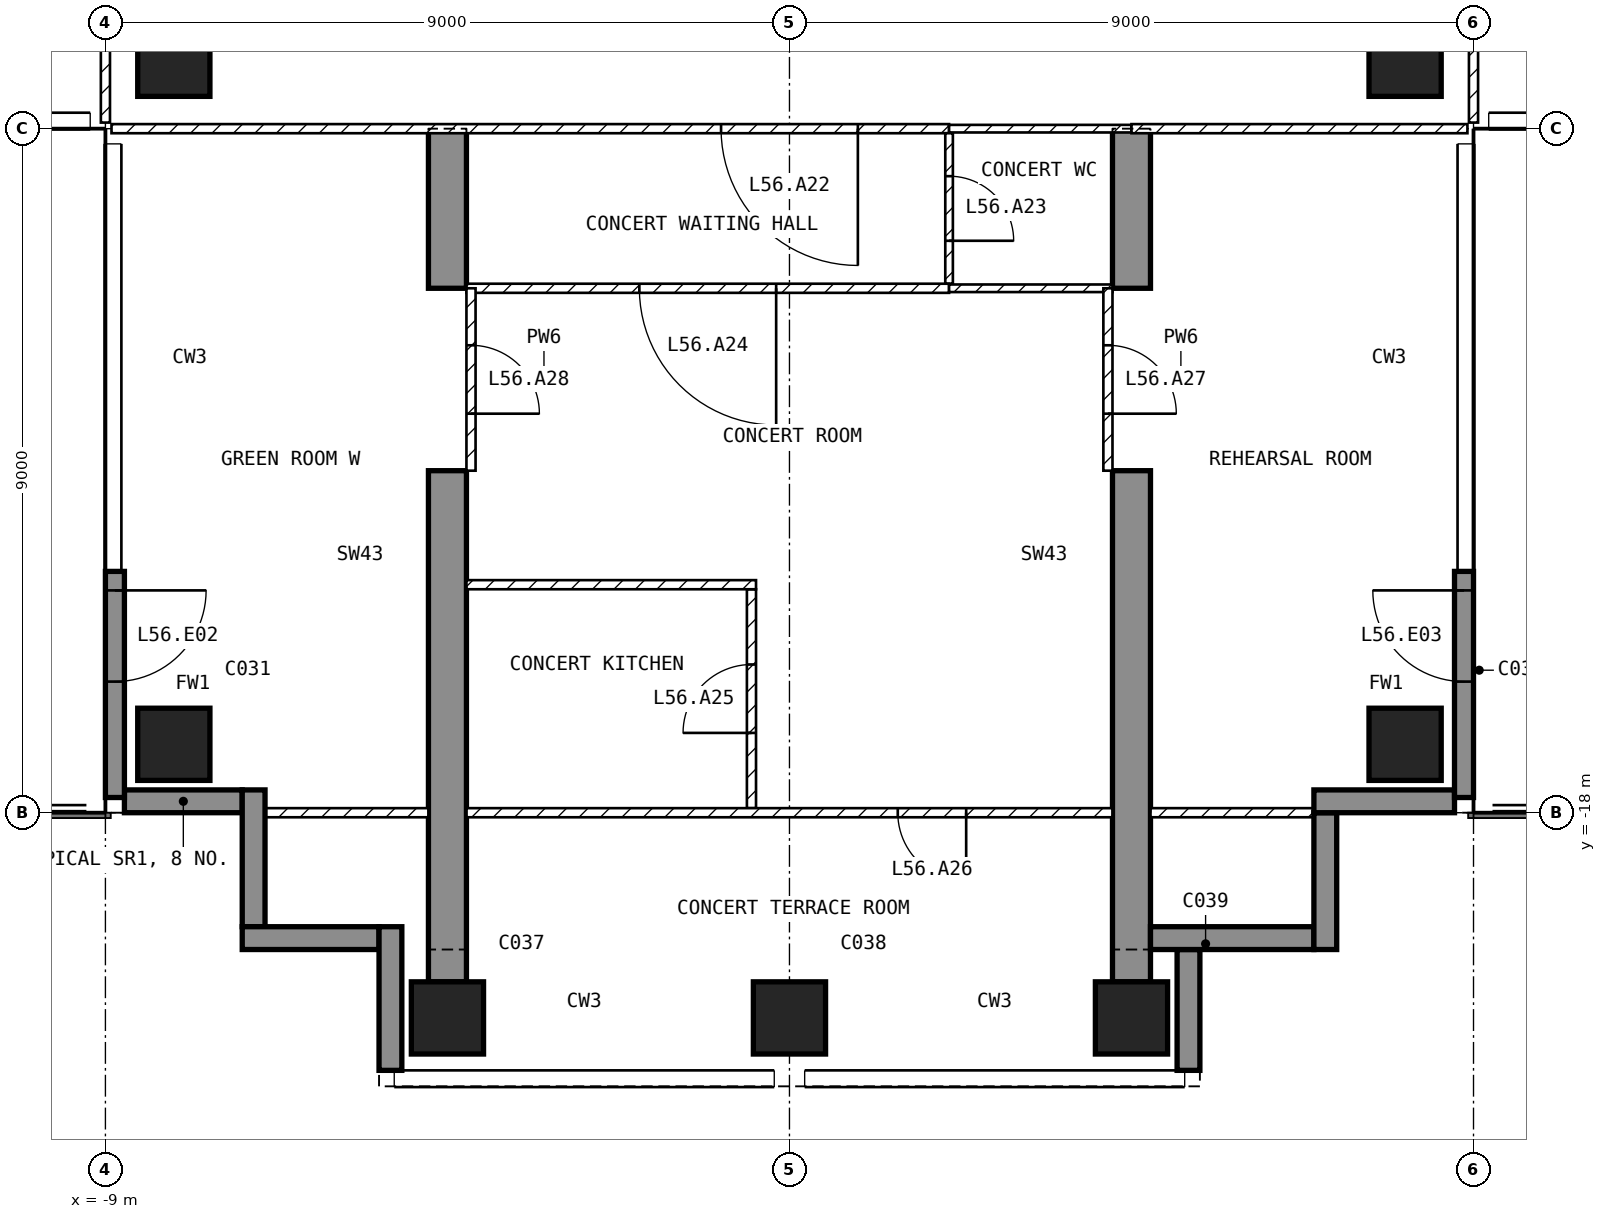
"""IFC4 building model, lengths in metres.
Left out: names, types, materials, properties, quantities, classifications, styles, units other than length and angle.
Written with IfcOpenShell. Run it as: python <this file> out.ifc"""

import sys

from ifc_helpers import new_model, si_unit, direction, frame, frame_2d, origin, origin_2d, place, context, subcontext, project, spatial, polyline, rectangle, outline, extrude, element, fill, save


model = new_model("IFC4")
c1 = context("Model", 3, precision=1e-05, world=origin(), true_north=direction((0.0, 1.0)))
c2 = subcontext(c1, "Body", "Model", "MODEL_VIEW")
j1 = project(units=[si_unit("LENGTHUNIT", "METRE"), si_unit("PLANEANGLEUNIT", "RADIAN")], contexts=[c1])
p1 = place(None, origin())
s1 = spatial("IfcSite", under=j1, at=p1, CompositionType="ELEMENT")
p2 = place(p1, origin())
s2 = spatial("IfcBuilding", under=s1, at=p2, CompositionType="ELEMENT")
p3 = place(p2, frame((0.0, 0.0, 222.6)))
s3 = spatial("IfcBuildingStorey", under=s2, at=p3, CompositionType="ELEMENT", Elevation=222.6)
for number, where, z_axis, x_axis in (
    (1, (-8.1, -17.1, -0.3), (0.0, 0.0, 1.0), (1.0, 0.0, 0.0)),
    (2, (-8.1, -8.1, -0.3), (0.0, 0.0, 1.0), (1.0, 0.0, 0.0)),
    (3, (-4.5, -20.7, -0.3), (0.0, 0.0, 1.0), (1.0, 0.0, 0.0)),
    (4, (0.0, -20.7, -0.3), (0.0, 0.0, 1.0), (1.0, 0.0, 0.0)),
    (5, (4.5, -20.7, -0.3), (0.0, 0.0, 1.0), (1.0, 0.0, 0.0)),
    (6, (8.1, -17.1, -0.3), (0.0, 0.0, 1.0), (1.0, 0.0, 0.0)),
    (7, (8.1, -8.1, -0.3), (0.0, 0.0, 1.0), (1.0, 0.0, 0.0)),
):
    element("IfcColumn", number, at=place(p3, frame(where, z_axis=z_axis, x_axis=x_axis)), inside=s3, PredefinedType="COLUMN", context=c2, shape_type="SweptSolid", body=[
        extrude(rectangle(XDim=0.95, YDim=0.95, at=origin_2d()), origin(), (0.0, 0.0, 1.0), 5.25),
    ])
for number, where, z_axis, x_axis in (
    (8, (-4.75, -20.225, -0.3), (1.0, 0.0, 0.0), (0.0, 1.0, 0.0)),
    (9, (4.25, -20.225, -0.3), (1.0, 0.0, 0.0), (0.0, 1.0, 0.0)),
):
    element("IfcWall", number, at=place(p3, frame(where, z_axis=z_axis, x_axis=x_axis)), inside=s3, PredefinedType="SHEAR", context=c2, shape_type="SweptSolid", body=[
        extrude(outline(polyline([(0.0, 0.0), (6.725, 0.0), (6.725, 2.7), (9.125, 2.7), (9.125, 0.0), (11.225, 0.0), (11.225, 5.25), (0.0, 5.25), (0.0, 0.0)])), origin(), (0.0, 0.0, 1.0), 0.5),
    ])
p4 = place(p3, frame((-8.875, -14.825, 0.0), z_axis=(0.0, 0.0, 1.0), x_axis=(0.0, -1.0, 0.0)))
e10 = element("IfcWall", 10, at=p4, inside=s3, PredefinedType="SOLIDWALL", context=c2, shape_type="SweptSolid", body=[
    extrude(rectangle(XDim=2.975, YDim=0.25, at=frame_2d((1.488, 0.0))), origin(), (0.0, 0.0, 1.0), 4.95),
])
p5 = place(p4, frame((0.25, 0.0, 0.0)))
e11 = element("IfcOpeningElement", 11, at=p5, cuts=e10, PredefinedType="OPENING", context=c2, shape_type="SweptSolid", body=[
    extrude(rectangle(XDim=1.2, YDim=2.4, at=frame_2d((0.6, 1.2))), frame((0.0, 0.135, 0.0), z_axis=(0.0, -1.0, 0.0), x_axis=(1.0, 0.0, 0.0)), (0.0, 0.0, 1.0), 0.27),
])
p6 = place(p3, frame((8.875, -17.8, 0.0), z_axis=(0.0, 0.0, 1.0), x_axis=(0.0, 1.0, 0.0)))
e12 = element("IfcWall", 12, at=p6, inside=s3, PredefinedType="SOLIDWALL", context=c2, shape_type="SweptSolid", body=[
    extrude(rectangle(XDim=2.975, YDim=0.25, at=frame_2d((1.488, 0.0))), origin(), (0.0, 0.0, 1.0), 4.95),
])
p7 = place(p6, frame((1.525, 0.0, 0.0)))
e13 = element("IfcOpeningElement", 13, at=p7, cuts=e12, PredefinedType="OPENING", context=c2, shape_type="SweptSolid", body=[
    extrude(rectangle(XDim=1.2, YDim=2.4, at=frame_2d((0.6, 1.2))), frame((0.0, 0.135, 0.0), z_axis=(0.0, -1.0, 0.0), x_axis=(1.0, 0.0, 0.0)), (0.0, 0.0, 1.0), 0.27),
])
p8 = place(p3, frame((5.25, -21.39, 0.0), z_axis=(0.0, 0.0, 1.0), x_axis=(0.0, 1.0, 0.0)))
e14 = element("IfcWall", 14, at=p8, inside=s3, PredefinedType="SOLIDWALL", context=c2, shape_type="SweptSolid", body=[
    extrude(rectangle(XDim=1.59, YDim=0.3, at=frame_2d((0.795, 0.0))), origin(), (0.0, 0.0, 1.0), 4.95),
])
p9 = place(p3, frame((4.75, -19.65, 0.0), z_axis=(0.0, 0.0, 1.0), x_axis=(1.0, 0.0, 0.0)))
e15 = element("IfcWall", 15, at=p9, inside=s3, PredefinedType="SOLIDWALL", context=c2, shape_type="SweptSolid", body=[
    extrude(rectangle(XDim=2.15, YDim=0.3, at=frame_2d((1.075, 0.0))), origin(), (0.0, 0.0, 1.0), 4.95),
])
p10 = place(p3, frame((7.05, -19.8, 0.0), z_axis=(0.0, 0.0, 1.0), x_axis=(0.0, 1.0, 0.0)))
e16 = element("IfcWall", 16, at=p10, inside=s3, PredefinedType="SOLIDWALL", context=c2, shape_type="SweptSolid", body=[
    extrude(rectangle(XDim=1.8, YDim=0.3, at=frame_2d((0.9, 0.0))), origin(), (0.0, 0.0, 1.0), 4.95),
])
p11 = place(p3, frame((6.9, -17.85, 0.0), z_axis=(0.0, 0.0, 1.0), x_axis=(1.0, 0.0, 0.0)))
e17 = element("IfcWall", 17, at=p11, inside=s3, PredefinedType="SOLIDWALL", context=c2, shape_type="SweptSolid", body=[
    extrude(rectangle(XDim=1.85, YDim=0.3, at=frame_2d((0.925, 0.0))), origin(), (0.0, 0.0, 1.0), 4.95),
])
p12 = place(p3, frame((-8.75, -17.85, 0.0), z_axis=(0.0, 0.0, 1.0), x_axis=(1.0, 0.0, 0.0)))
e18 = element("IfcWall", 18, at=p12, inside=s3, PredefinedType="SOLIDWALL", context=c2, shape_type="SweptSolid", body=[
    extrude(rectangle(XDim=1.55, YDim=0.3, at=frame_2d((0.775, 0.0))), origin(), (0.0, 0.0, 1.0), 4.95),
])
for number, where, z_axis, x_axis in (
    (19, (-7.05, -17.7, 0.0), (0.0, 0.0, 1.0), (0.0, -1.0, 0.0)),
    (20, (-7.2, -19.65, 0.0), (0.0, 0.0, 1.0), (1.0, 0.0, 0.0)),
):
    element("IfcWall", number, at=place(p3, frame(where, z_axis=z_axis, x_axis=x_axis)), inside=s3, PredefinedType="SOLIDWALL", context=c2, shape_type="SweptSolid", body=[
        extrude(rectangle(XDim=1.8, YDim=0.3, at=frame_2d((0.9, 0.0))), origin(), (0.0, 0.0, 1.0), 4.95),
    ])
p13 = place(p3, frame((-5.25, -19.5, 0.0), z_axis=(0.0, 0.0, 1.0), x_axis=(0.0, -1.0, 0.0)))
e21 = element("IfcWall", 21, at=p13, inside=s3, PredefinedType="SOLIDWALL", context=c2, shape_type="SweptSolid", body=[
    extrude(rectangle(XDim=1.89, YDim=0.3, at=frame_2d((0.945, 0.0))), origin(), (0.0, 0.0, 1.0), 4.95),
])
p14 = place(p3, frame((9.0, -1.26, 0.0), z_axis=(0.0, 0.0, 1.0), x_axis=(0.0, -1.0, 0.0)))
e22 = element("IfcWall", 22, at=p14, inside=s3, PredefinedType="PARTITIONING", context=c2, shape_type="SweptSolid", body=[
    extrude(rectangle(XDim=7.66, YDim=0.12, at=frame_2d((3.83, 0.0))), origin(), (0.0, 0.0, 1.0), 4.95),
])
p15 = place(p14, frame((4.34, 0.0, 0.0)))
e23 = element("IfcOpeningElement", 23, at=p15, cuts=e22, PredefinedType="OPENING", context=c2, shape_type="SweptSolid", body=[
    extrude(rectangle(XDim=0.9, YDim=2.1, at=frame_2d((0.45, 1.05))), frame((0.0, 0.07, 0.0), z_axis=(0.0, -1.0, 0.0), x_axis=(1.0, 0.0, 0.0)), (0.0, 0.0, 1.0), 0.14),
])
p16 = place(p3, frame((-9.0, -8.92, 0.0), z_axis=(0.0, 0.0, 1.0), x_axis=(0.0, 1.0, 0.0)))
e24 = element("IfcWall", 24, at=p16, inside=s3, PredefinedType="PARTITIONING", context=c2, shape_type="SweptSolid", body=[
    extrude(rectangle(XDim=7.66, YDim=0.12, at=frame_2d((3.83, 0.0))), origin(), (0.0, 0.0, 1.0), 4.95),
])
p17 = place(p3, frame((2.1, -9.0, 0.0), z_axis=(0.0, 0.0, 1.0), x_axis=(-1.0, 0.0, 0.0)))
e25 = element("IfcWall", 25, at=p17, inside=s3, PredefinedType="PARTITIONING", context=c2, shape_type="SweptSolid", body=[
    extrude(rectangle(XDim=11.02, YDim=0.12, at=frame_2d((5.51, 0.0))), origin(), (0.0, 0.0, 1.0), 4.95),
])
p18 = place(p17, frame((1.2, 0.0, 0.0)))
e26 = element("IfcOpeningElement", 26, at=p18, cuts=e25, PredefinedType="OPENING", context=c2, shape_type="SweptSolid", body=[
    extrude(rectangle(XDim=1.8, YDim=2.1, at=frame_2d((0.9, 1.05))), frame((0.0, 0.07, 0.0), z_axis=(0.0, -1.0, 0.0), x_axis=(1.0, 0.0, 0.0)), (0.0, 0.0, 1.0), 0.14),
])
p19 = place(p3, frame((4.5, -9.0, 0.0), z_axis=(0.0, 0.0, 1.0), x_axis=(-1.0, 0.0, 0.0)))
e27 = element("IfcWall", 27, at=p19, inside=s3, PredefinedType="PARTITIONING", context=c2, shape_type="SweptSolid", body=[
    extrude(rectangle(XDim=2.4, YDim=0.1, at=frame_2d((1.2, 0.0))), origin(), (0.0, 0.0, 1.0), 4.95),
])
p20 = place(p3, frame((8.92, -9.0, 0.0), z_axis=(0.0, 0.0, 1.0), x_axis=(-1.0, 0.0, 0.0)))
e28 = element("IfcWall", 28, at=p20, inside=s3, PredefinedType="PARTITIONING", context=c2, shape_type="SweptSolid", body=[
    extrude(rectangle(XDim=4.42, YDim=0.12, at=frame_2d((2.21, 0.0))), origin(), (0.0, 0.0, 1.0), 4.95),
])
p21 = place(p3, frame((2.1, -9.06, 0.0), z_axis=(0.0, 0.0, 1.0), x_axis=(0.0, -1.0, 0.0)))
e29 = element("IfcWall", 29, at=p21, inside=s3, PredefinedType="PARTITIONING", context=c2, shape_type="SweptSolid", body=[
    extrude(rectangle(XDim=1.98, YDim=0.1, at=frame_2d((0.99, 0.0))), origin(), (0.0, 0.0, 1.0), 4.95),
])
p22 = place(p21, frame((0.565, 0.0, 0.0)))
e30 = element("IfcOpeningElement", 30, at=p22, cuts=e29, PredefinedType="OPENING", context=c2, shape_type="SweptSolid", body=[
    extrude(rectangle(XDim=0.85, YDim=2.1, at=frame_2d((0.425, 1.05))), frame((0.0, 0.06, 0.0), z_axis=(0.0, -1.0, 0.0), x_axis=(1.0, 0.0, 0.0)), (0.0, 0.0, 1.0), 0.12),
])
p23 = place(p3, frame((2.1, -11.1, 0.0), z_axis=(0.0, 0.0, 1.0), x_axis=(-1.0, 0.0, 0.0)))
e31 = element("IfcWall", 31, at=p23, inside=s3, PredefinedType="PARTITIONING", context=c2, shape_type="SweptSolid", body=[
    extrude(rectangle(XDim=6.35, YDim=0.12, at=frame_2d((3.175, 0.0))), origin(), (0.0, 0.0, 1.0), 4.95),
])
p24 = place(p23, frame((2.275, 0.0, 0.0)))
e32 = element("IfcOpeningElement", 32, at=p24, cuts=e31, PredefinedType="OPENING", context=c2, shape_type="SweptSolid", body=[
    extrude(rectangle(XDim=1.8, YDim=2.1, at=frame_2d((0.9, 1.05))), frame((0.0, 0.07, 0.0), z_axis=(0.0, -1.0, 0.0), x_axis=(1.0, 0.0, 0.0)), (0.0, 0.0, 1.0), 0.14),
])
p25 = place(p3, frame((4.25, -11.1, 0.0), z_axis=(0.0, 0.0, 1.0), x_axis=(-1.0, 0.0, 0.0)))
e33 = element("IfcWall", 33, at=p25, inside=s3, PredefinedType="PARTITIONING", context=c2, shape_type="SweptSolid", body=[
    extrude(rectangle(XDim=2.15, YDim=0.1, at=frame_2d((1.075, 0.0))), origin(), (0.0, 0.0, 1.0), 4.95),
])
p26 = place(p3, frame((-0.5, -17.94, 0.0), z_axis=(0.0, 0.0, 1.0), x_axis=(0.0, 1.0, 0.0)))
e34 = element("IfcWall", 34, at=p26, inside=s3, PredefinedType="PARTITIONING", context=c2, shape_type="SweptSolid", body=[
    extrude(rectangle(XDim=2.88, YDim=0.12, at=frame_2d((1.44, 0.0))), origin(), (0.0, 0.0, 1.0), 4.95),
])
p27 = place(p26, frame((0.99, 0.0, 0.0)))
e35 = element("IfcOpeningElement", 35, at=p27, cuts=e34, PredefinedType="OPENING", context=c2, shape_type="SweptSolid", body=[
    extrude(rectangle(XDim=0.9, YDim=2.1, at=frame_2d((0.45, 1.05))), frame((0.0, 0.07, 0.0), z_axis=(0.0, -1.0, 0.0), x_axis=(1.0, 0.0, 0.0)), (0.0, 0.0, 1.0), 0.14),
])
p28 = place(p3, frame((-0.44, -15.0, 0.0), z_axis=(0.0, 0.0, 1.0), x_axis=(-1.0, 0.0, 0.0)))
e36 = element("IfcWall", 36, at=p28, inside=s3, PredefinedType="PARTITIONING", context=c2, shape_type="SweptSolid", body=[
    extrude(rectangle(XDim=3.81, YDim=0.12, at=frame_2d((1.905, 0.0))), origin(), (0.0, 0.0, 1.0), 4.95),
])
p29 = place(p3, frame((4.25, -18.0, 0.0), z_axis=(0.0, 0.0, 1.0), x_axis=(-1.0, 0.0, 0.0)))
e37 = element("IfcWall", 37, at=p29, inside=s3, PredefinedType="PARTITIONING", context=c2, shape_type="SweptSolid", body=[
    extrude(rectangle(XDim=8.5, YDim=0.12, at=frame_2d((4.25, 0.0))), origin(), (0.0, 0.0, 1.0), 4.95),
])
p30 = place(p29, frame((1.925, 0.0, 0.0)))
e38 = element("IfcOpeningElement", 38, at=p30, cuts=e37, PredefinedType="OPENING", context=c2, shape_type="SweptSolid", body=[
    extrude(rectangle(XDim=0.9, YDim=2.1, at=frame_2d((0.45, 1.05))), frame((0.0, 0.07, 0.0), z_axis=(0.0, -1.0, 0.0), x_axis=(1.0, 0.0, 0.0)), (0.0, 0.0, 1.0), 0.14),
])
for number, where, z_axis, x_axis in (
    (39, (7.12, -18.0, 0.0), (0.0, 0.0, 1.0), (-1.0, 0.0, 0.0)),
    (40, (-4.75, -18.0, 0.0), (0.0, 0.0, 1.0), (-1.0, 0.0, 0.0)),
):
    element("IfcWall", number, at=place(p3, frame(where, z_axis=z_axis, x_axis=x_axis)), inside=s3, PredefinedType="PARTITIONING", context=c2, shape_type="SweptSolid", body=[
        extrude(rectangle(XDim=2.37, YDim=0.12, at=frame_2d((1.185, 0.0))), origin(), (0.0, 0.0, 1.0), 4.95),
    ])
p31 = place(p3, frame((4.19, -11.1, 0.0), z_axis=(0.0, 0.0, 1.0), x_axis=(0.0, -1.0, 0.0)))
e41 = element("IfcWall", 41, at=p31, inside=s3, PredefinedType="PARTITIONING", context=c2, shape_type="SweptSolid", body=[
    extrude(rectangle(XDim=2.4, YDim=0.12, at=frame_2d((1.2, 0.0))), origin(), (0.0, 0.0, 1.0), 2.4),
])
p32 = place(p31, frame((0.75, 0.0, 0.0)))
e42 = element("IfcOpeningElement", 42, at=p32, cuts=e41, PredefinedType="OPENING", context=c2, shape_type="SweptSolid", body=[
    extrude(rectangle(XDim=0.9, YDim=2.1, at=frame_2d((0.45, 1.05))), frame((0.0, 0.07, 0.0), z_axis=(0.0, -1.0, 0.0), x_axis=(1.0, 0.0, 0.0)), (0.0, 0.0, 1.0), 0.14),
])
p33 = place(p3, frame((-4.19, -11.1, 0.0), z_axis=(0.0, 0.0, 1.0), x_axis=(0.0, -1.0, 0.0)))
e43 = element("IfcWall", 43, at=p33, inside=s3, PredefinedType="PARTITIONING", context=c2, shape_type="SweptSolid", body=[
    extrude(rectangle(XDim=2.4, YDim=0.12, at=frame_2d((1.2, 0.0))), origin(), (0.0, 0.0, 1.0), 2.4),
])
p34 = place(p33, frame((0.75, 0.0, 0.0)))
e44 = element("IfcOpeningElement", 44, at=p34, cuts=e43, PredefinedType="OPENING", context=c2, shape_type="SweptSolid", body=[
    extrude(rectangle(XDim=0.9, YDim=2.1, at=frame_2d((0.45, 1.05))), frame((0.0, 0.07, 0.0), z_axis=(0.0, -1.0, 0.0), x_axis=(1.0, 0.0, 0.0)), (0.0, 0.0, 1.0), 0.14),
])
p35 = place(p5, origin())
e45 = element("IfcDoor", 45, at=p35, inside=s3, OperationType="SINGLE_SWING_LEFT", PredefinedType="DOOR", context=c2, shape_type="SweptSolid", body=[
    extrude(rectangle(XDim=1.2, YDim=2.4, at=frame_2d((0.6, 1.2))), frame((0.0, 0.025, 0.0), z_axis=(0.0, -1.0, 0.0), x_axis=(1.0, 0.0, 0.0)), (0.0, 0.0, 1.0), 0.05),
])
fill(e11, e45)
p36 = place(p7, origin())
e46 = element("IfcDoor", 46, at=p36, inside=s3, OperationType="SINGLE_SWING_RIGHT", PredefinedType="DOOR", context=c2, shape_type="SweptSolid", body=[
    extrude(rectangle(XDim=1.2, YDim=2.4, at=frame_2d((0.6, 1.2))), frame((0.0, 0.025, 0.0), z_axis=(0.0, -1.0, 0.0), x_axis=(1.0, 0.0, 0.0)), (0.0, 0.0, 1.0), 0.05),
])
fill(e13, e46)
p37 = place(p18, origin())
e47 = element("IfcDoor", 47, at=p37, inside=s3, OperationType="SINGLE_SWING_LEFT", PredefinedType="DOOR", context=c2, shape_type="SweptSolid", body=[
    extrude(rectangle(XDim=1.8, YDim=2.1, at=frame_2d((0.9, 1.05))), frame((0.0, 0.025, 0.0), z_axis=(0.0, -1.0, 0.0), x_axis=(1.0, 0.0, 0.0)), (0.0, 0.0, 1.0), 0.05),
])
fill(e26, e47)
p38 = place(p22, origin())
e48 = element("IfcDoor", 48, at=p38, inside=s3, OperationType="SINGLE_SWING_RIGHT", PredefinedType="DOOR", context=c2, shape_type="SweptSolid", body=[
    extrude(rectangle(XDim=0.85, YDim=2.1, at=frame_2d((0.425, 1.05))), frame((0.0, 0.025, 0.0), z_axis=(0.0, -1.0, 0.0), x_axis=(1.0, 0.0, 0.0)), (0.0, 0.0, 1.0), 0.05),
])
fill(e30, e48)
p39 = place(p24, origin())
e49 = element("IfcDoor", 49, at=p39, inside=s3, OperationType="SINGLE_SWING_LEFT", PredefinedType="DOOR", context=c2, shape_type="SweptSolid", body=[
    extrude(rectangle(XDim=1.8, YDim=2.1, at=frame_2d((0.9, 1.05))), frame((0.0, 0.025, 0.0), z_axis=(0.0, -1.0, 0.0), x_axis=(1.0, 0.0, 0.0)), (0.0, 0.0, 1.0), 0.05),
])
fill(e32, e49)
p40 = place(p27, origin())
e50 = element("IfcDoor", 50, at=p40, inside=s3, OperationType="SINGLE_SWING_LEFT", PredefinedType="DOOR", context=c2, shape_type="SweptSolid", body=[
    extrude(rectangle(XDim=0.9, YDim=2.1, at=frame_2d((0.45, 1.05))), frame((0.0, 0.025, 0.0), z_axis=(0.0, -1.0, 0.0), x_axis=(1.0, 0.0, 0.0)), (0.0, 0.0, 1.0), 0.05),
])
fill(e35, e50)
p41 = place(p30, origin())
e51 = element("IfcDoor", 51, at=p41, inside=s3, OperationType="SINGLE_SWING_LEFT", PredefinedType="DOOR", context=c2, shape_type="SweptSolid", body=[
    extrude(rectangle(XDim=0.9, YDim=2.1, at=frame_2d((0.45, 1.05))), frame((0.0, 0.025, 0.0), z_axis=(0.0, -1.0, 0.0), x_axis=(1.0, 0.0, 0.0)), (0.0, 0.0, 1.0), 0.05),
])
fill(e38, e51)
p42 = place(p32, origin())
e52 = element("IfcDoor", 52, at=p42, inside=s3, OperationType="SINGLE_SWING_RIGHT", PredefinedType="DOOR", context=c2, shape_type="SweptSolid", body=[
    extrude(rectangle(XDim=0.9, YDim=2.1, at=frame_2d((0.45, 1.05))), frame((0.0, 0.025, 0.0), z_axis=(0.0, -1.0, 0.0), x_axis=(1.0, 0.0, 0.0)), (0.0, 0.0, 1.0), 0.05),
])
fill(e42, e52)
p43 = place(p34, origin())
e53 = element("IfcDoor", 53, at=p43, inside=s3, OperationType="SINGLE_SWING_RIGHT", PredefinedType="DOOR", context=c2, shape_type="SweptSolid", body=[
    extrude(rectangle(XDim=0.9, YDim=2.1, at=frame_2d((0.45, 1.05))), frame((0.0, 0.025, 0.0), z_axis=(0.0, -1.0, 0.0), x_axis=(1.0, 0.0, 0.0)), (0.0, 0.0, 1.0), 0.05),
])
fill(e44, e53)
save(model, sys.argv[1])
